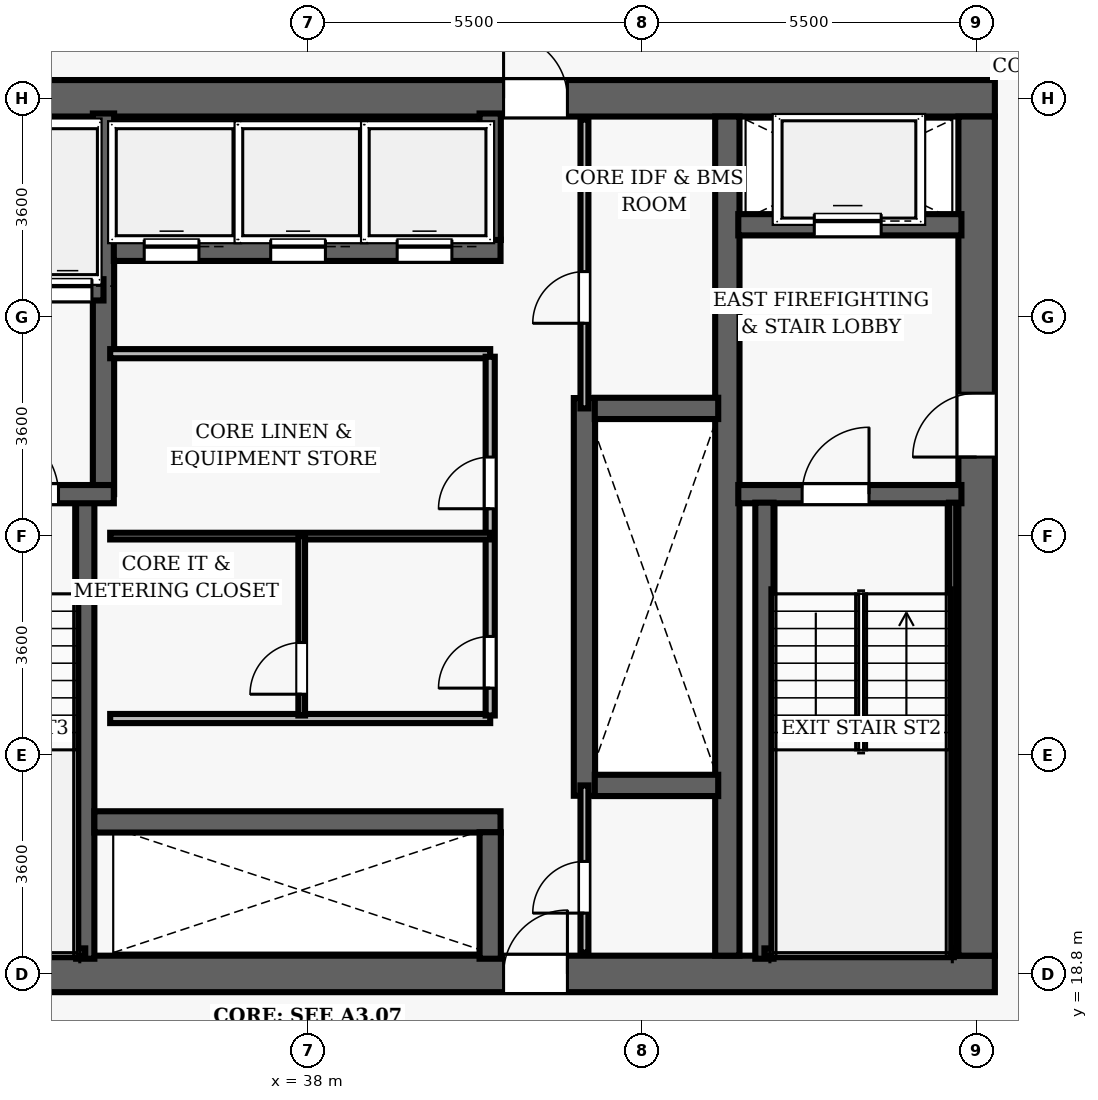
"""IFC4 building model, lengths in metres.
Left out: names, types, materials, properties, quantities, classifications, styles, units other than length and angle.
Written with IfcOpenShell. Run it as: python <this file> out.ifc"""

import sys

from ifc_helpers import new_model, si_unit, direction, frame, frame_2d, origin, place, context, subcontext, project, spatial, rectangle, extrude, element, fill, save


model = new_model("IFC4")
c1 = context("Model", 3, precision=1e-05, world=origin(), true_north=direction((0.0, 1.0)))
c2 = subcontext(c1, "Body", "Model", "MODEL_VIEW")
j1 = project(units=[si_unit("LENGTHUNIT", "METRE"), si_unit("PLANEANGLEUNIT", "RADIAN")], contexts=[c1])
p1 = place(None, origin())
s1 = spatial("IfcSite", under=j1, at=p1, CompositionType="ELEMENT")
p2 = place(p1, origin())
s2 = spatial("IfcBuilding", under=s1, at=p2, CompositionType="ELEMENT")
p3 = place(p2, frame((0.0, 0.0, 62.4)))
s3 = spatial("IfcBuildingStorey", under=s2, at=p3, CompositionType="ELEMENT", Elevation=62.4)
p4 = place(p3, frame((26.7, 18.8, 0.0), z_axis=(0.0, 0.0, 1.0), x_axis=(1.0, 0.0, 0.0)))
e1 = element("IfcWall", 1, at=p4, inside=s3, PredefinedType="SHEAR", context=c2, shape_type="SweptSolid", body=[
    extrude(rectangle(XDim=22.6, YDim=0.6, at=frame_2d((11.3, 0.0))), origin(), (0.0, 0.0, 1.0), 3.5),
])
p5 = place(p4, frame((14.52, 0.0, 0.0)))
e2 = element("IfcOpeningElement", 2, at=p5, cuts=e1, PredefinedType="OPENING", context=c2, shape_type="SweptSolid", body=[
    extrude(rectangle(XDim=1.05, YDim=2.15, at=frame_2d((0.525, 1.075))), frame((0.0, 0.31, 0.0), z_axis=(0.0, -1.0, 0.0), x_axis=(1.0, 0.0, 0.0)), (0.0, 0.0, 1.0), 0.62),
])
p6 = place(p3, frame((26.7, 33.2, 0.0), z_axis=(0.0, 0.0, 1.0), x_axis=(1.0, 0.0, 0.0)))
e3 = element("IfcWall", 3, at=p6, inside=s3, PredefinedType="SHEAR", context=c2, shape_type="SweptSolid", body=[
    extrude(rectangle(XDim=22.6, YDim=0.6, at=frame_2d((11.3, 0.0))), origin(), (0.0, 0.0, 1.0), 3.5),
])
p7 = place(p6, frame((4.62, 0.0, 0.0)))
e4 = element("IfcOpeningElement", 4, at=p7, cuts=e3, PredefinedType="OPENING", context=c2, shape_type="SweptSolid", body=[
    extrude(rectangle(XDim=1.05, YDim=2.15, at=frame_2d((0.525, 1.075))), frame((0.0, 0.31, 0.0), z_axis=(0.0, -1.0, 0.0), x_axis=(1.0, 0.0, 0.0)), (0.0, 0.0, 1.0), 0.62),
])
p8 = place(p6, frame((14.52, 0.0, 0.0)))
e5 = element("IfcOpeningElement", 5, at=p8, cuts=e3, PredefinedType="OPENING", context=c2, shape_type="SweptSolid", body=[
    extrude(rectangle(XDim=1.05, YDim=2.15, at=frame_2d((0.525, 1.075))), frame((0.0, 0.31, 0.0), z_axis=(0.0, -1.0, 0.0), x_axis=(1.0, 0.0, 0.0)), (0.0, 0.0, 1.0), 0.62),
])
p9 = place(p3, frame((49.0, 19.1, 0.0), z_axis=(0.0, 0.0, 1.0), x_axis=(0.0, 1.0, 0.0)))
e6 = element("IfcWall", 6, at=p9, inside=s3, PredefinedType="SHEAR", context=c2, shape_type="SweptSolid", body=[
    extrude(rectangle(XDim=13.8, YDim=0.6, at=frame_2d((6.9, 0.0))), origin(), (0.0, 0.0, 1.0), 3.5),
])
p10 = place(p9, frame((8.2, 0.0, 0.0)))
e7 = element("IfcOpeningElement", 7, at=p10, cuts=e6, PredefinedType="OPENING", context=c2, shape_type="SweptSolid", body=[
    extrude(rectangle(XDim=1.05, YDim=2.15, at=frame_2d((0.525, 1.075))), frame((0.0, 0.31, 0.0), z_axis=(0.0, -1.0, 0.0), x_axis=(1.0, 0.0, 0.0)), (0.0, 0.0, 1.0), 0.62),
])
p11 = place(p3, frame((44.9, 19.1, 0.0), z_axis=(0.0, 0.0, 1.0), x_axis=(0.0, 1.0, 0.0)))
e8 = element("IfcWall", 8, at=p11, inside=s3, PredefinedType="SHEAR", context=c2, shape_type="SweptSolid", body=[
    extrude(rectangle(XDim=13.8, YDim=0.4, at=frame_2d((6.9, 0.0))), origin(), (0.0, 0.0, 1.0), 3.5),
])
p12 = place(p3, frame((45.08, 26.69, 0.0), z_axis=(0.0, 0.0, 1.0), x_axis=(1.0, 0.0, 0.0)))
e9 = element("IfcWall", 9, at=p12, inside=s3, PredefinedType="SHEAR", context=c2, shape_type="SweptSolid", body=[
    extrude(rectangle(XDim=3.67, YDim=0.3, at=frame_2d((1.835, 0.0))), origin(), (0.0, 0.0, 1.0), 3.5),
])
p13 = place(p12, frame((1.05, 0.0, 0.0)))
e10 = element("IfcOpeningElement", 10, at=p13, cuts=e9, PredefinedType="OPENING", context=c2, shape_type="SweptSolid", body=[
    extrude(rectangle(XDim=1.1, YDim=2.15, at=frame_2d((0.55, 1.075))), frame((0.0, 0.16, 0.0), z_axis=(0.0, -1.0, 0.0), x_axis=(1.0, 0.0, 0.0)), (0.0, 0.0, 1.0), 0.32),
])
p14 = place(p3, frame((45.51, 19.05, 0.0), z_axis=(0.0, 0.0, 1.0), x_axis=(0.0, 1.0, 0.0)))
e11 = element("IfcWall", 11, at=p14, inside=s3, PredefinedType="SHEAR", context=c2, shape_type="SweptSolid", body=[
    extrude(rectangle(XDim=7.5, YDim=0.3, at=frame_2d((3.75, 0.0))), origin(), (0.0, 0.0, 1.0), 3.5),
])
p15 = place(p3, frame((48.605, 19.1, 0.0), z_axis=(0.0, 0.0, 1.0), x_axis=(0.0, 1.0, 0.0)))
e12 = element("IfcWall", 12, at=p15, inside=s3, PredefinedType="SHEAR", context=c2, shape_type="SweptSolid", body=[
    extrude(rectangle(XDim=7.45, YDim=0.12, at=frame_2d((3.725, 0.0))), origin(), (0.0, 0.0, 1.0), 3.5),
])
p16 = place(p3, frame((45.51, 19.16, 0.0), z_axis=(0.0, 0.0, 1.0), x_axis=(1.0, 0.0, 0.0)))
e13 = element("IfcWall", 13, at=p16, inside=s3, PredefinedType="SHEAR", context=c2, shape_type="SweptSolid", body=[
    extrude(rectangle(XDim=3.095, YDim=0.12, at=frame_2d((1.547, 0.0))), origin(), (0.0, 0.0, 1.0), 3.5),
])
p17 = place(p3, frame((45.08, 31.12, 0.0), z_axis=(0.0, 0.0, 1.0), x_axis=(1.0, 0.0, 0.0)))
e14 = element("IfcWall", 14, at=p17, inside=s3, PredefinedType="SHEAR", context=c2, shape_type="SweptSolid", body=[
    extrude(rectangle(XDim=3.67, YDim=0.35, at=frame_2d((1.835, 0.0))), origin(), (0.0, 0.0, 1.0), 2.6),
])
p18 = place(p17, frame((1.25, 0.0, 0.0)))
e15 = element("IfcOpeningElement", 15, at=p18, cuts=e14, PredefinedType="OPENING", context=c2, shape_type="SweptSolid", body=[
    extrude(rectangle(XDim=1.1, YDim=2.15, at=frame_2d((0.55, 1.075))), frame((0.0, 0.185, 0.0), z_axis=(0.0, -1.0, 0.0), x_axis=(1.0, 0.0, 0.0)), (0.0, 0.0, 1.0), 0.37),
])
p19 = place(p3, frame((34.34, 19.05, 0.0), z_axis=(0.0, 0.0, 1.0), x_axis=(0.0, 1.0, 0.0)))
e16 = element("IfcWall", 16, at=p19, inside=s3, PredefinedType="SHEAR", context=c2, shape_type="SweptSolid", body=[
    extrude(rectangle(XDim=7.5, YDim=0.3, at=frame_2d((3.75, 0.0))), origin(), (0.0, 0.0, 1.0), 3.5),
])
p20 = place(p3, frame((34.64, 26.69, 0.0), z_axis=(0.0, 0.0, 1.0), x_axis=(0.0, 1.0, 0.0)))
e17 = element("IfcWall", 17, at=p20, inside=s3, PredefinedType="SHEAR", context=c2, shape_type="SweptSolid", body=[
    extrude(rectangle(XDim=6.26, YDim=0.35, at=frame_2d((3.13, 0.0))), origin(), (0.0, 0.0, 1.0), 3.5),
])
p21 = place(p3, frame((31.25, 26.69, 0.0), z_axis=(0.0, 0.0, 1.0), x_axis=(1.0, 0.0, 0.0)))
e18 = element("IfcWall", 18, at=p21, inside=s3, PredefinedType="SHEAR", context=c2, shape_type="SweptSolid", body=[
    extrude(rectangle(XDim=3.56, YDim=0.3, at=frame_2d((1.78, 0.0))), origin(), (0.0, 0.0, 1.0), 3.5),
])
p22 = place(p21, frame((1.55, 0.0, 0.0)))
e19 = element("IfcOpeningElement", 19, at=p22, cuts=e18, PredefinedType="OPENING", context=c2, shape_type="SweptSolid", body=[
    extrude(rectangle(XDim=1.1, YDim=2.15, at=frame_2d((0.55, 1.075))), frame((0.0, 0.16, 0.0), z_axis=(0.0, -1.0, 0.0), x_axis=(1.0, 0.0, 0.0)), (0.0, 0.0, 1.0), 0.32),
])
p23 = place(p3, frame((31.3, 19.16, 0.0), z_axis=(0.0, 0.0, 1.0), x_axis=(1.0, 0.0, 0.0)))
e20 = element("IfcWall", 20, at=p23, inside=s3, PredefinedType="SHEAR", context=c2, shape_type="SweptSolid", body=[
    extrude(rectangle(XDim=3.04, YDim=0.12, at=frame_2d((1.52, 0.0))), origin(), (0.0, 0.0, 1.0), 3.5),
])
p24 = place(p3, frame((32.23, 30.05, 0.0), z_axis=(0.0, 0.0, 1.0), x_axis=(1.0, 0.0, 0.0)))
e21 = element("IfcWall", 21, at=p24, inside=s3, PredefinedType="SHEAR", context=c2, shape_type="SweptSolid", body=[
    extrude(rectangle(XDim=2.41, YDim=0.35, at=frame_2d((1.205, 0.0))), origin(), (0.0, 0.0, 1.0), 2.6),
])
p25 = place(p24, frame((0.42, 0.0, 0.0)))
e22 = element("IfcOpeningElement", 22, at=p25, cuts=e21, PredefinedType="OPENING", context=c2, shape_type="SweptSolid", body=[
    extrude(rectangle(XDim=0.8, YDim=2.15, at=frame_2d((0.4, 1.075))), frame((0.0, 0.185, 0.0), z_axis=(0.0, -1.0, 0.0), x_axis=(1.0, 0.0, 0.0)), (0.0, 0.0, 1.0), 0.37),
])
p26 = place(p24, frame((1.42, 0.0, 0.0)))
e23 = element("IfcOpeningElement", 23, at=p26, cuts=e21, PredefinedType="OPENING", context=c2, shape_type="SweptSolid", body=[
    extrude(rectangle(XDim=0.8, YDim=2.15, at=frame_2d((0.4, 1.075))), frame((0.0, 0.185, 0.0), z_axis=(0.0, -1.0, 0.0), x_axis=(1.0, 0.0, 0.0)), (0.0, 0.0, 1.0), 0.37),
])
p27 = place(p3, frame((42.55, 21.73, 0.0), z_axis=(0.0, 0.0, 1.0), x_axis=(0.0, 1.0, 0.0)))
e24 = element("IfcWall", 24, at=p27, inside=s3, PredefinedType="SHEAR", context=c2, shape_type="SweptSolid", body=[
    extrude(rectangle(XDim=6.54, YDim=0.35, at=frame_2d((3.27, 0.0))), origin(), (0.0, 0.0, 1.0), 2.6),
])
for number, where, z_axis, x_axis in (
    (25, (42.72, 21.9, 0.0), (0.0, 0.0, 1.0), (1.0, 0.0, 0.0)),
    (26, (42.72, 28.1, 0.0), (0.0, 0.0, 1.0), (1.0, 0.0, 0.0)),
):
    element("IfcWall", number, at=place(p3, frame(where, z_axis=z_axis, x_axis=x_axis)), inside=s3, PredefinedType="SHEAR", context=c2, shape_type="SweptSolid", body=[
        extrude(rectangle(XDim=2.03, YDim=0.35, at=frame_2d((1.015, 0.0))), origin(), (0.0, 0.0, 1.0), 2.6),
    ])
p28 = place(p3, frame((34.81, 30.7, 0.0), z_axis=(0.0, 0.0, 1.0), x_axis=(1.0, 0.0, 0.0)))
e27 = element("IfcWall", 27, at=p28, inside=s3, PredefinedType="SHEAR", context=c2, shape_type="SweptSolid", body=[
    extrude(rectangle(XDim=6.36, YDim=0.35, at=frame_2d((3.18, 0.0))), origin(), (0.0, 0.0, 1.0), 2.6),
])
p29 = place(p28, frame((0.5, 0.0, 0.0)))
e28 = element("IfcOpeningElement", 28, at=p29, cuts=e27, PredefinedType="OPENING", context=c2, shape_type="SweptSolid", body=[
    extrude(rectangle(XDim=0.9, YDim=2.15, at=frame_2d((0.45, 1.075))), frame((0.0, 0.185, 0.0), z_axis=(0.0, -1.0, 0.0), x_axis=(1.0, 0.0, 0.0)), (0.0, 0.0, 1.0), 0.37),
])
p30 = place(p28, frame((2.58, 0.0, 0.0)))
e29 = element("IfcOpeningElement", 29, at=p30, cuts=e27, PredefinedType="OPENING", context=c2, shape_type="SweptSolid", body=[
    extrude(rectangle(XDim=0.9, YDim=2.15, at=frame_2d((0.45, 1.075))), frame((0.0, 0.185, 0.0), z_axis=(0.0, -1.0, 0.0), x_axis=(1.0, 0.0, 0.0)), (0.0, 0.0, 1.0), 0.37),
])
p31 = place(p28, frame((4.66, 0.0, 0.0)))
e30 = element("IfcOpeningElement", 30, at=p31, cuts=e27, PredefinedType="OPENING", context=c2, shape_type="SweptSolid", body=[
    extrude(rectangle(XDim=0.9, YDim=2.15, at=frame_2d((0.45, 1.075))), frame((0.0, 0.185, 0.0), z_axis=(0.0, -1.0, 0.0), x_axis=(1.0, 0.0, 0.0)), (0.0, 0.0, 1.0), 0.37),
])
p32 = place(p3, frame((41.0, 30.87, 0.0), z_axis=(0.0, 0.0, 1.0), x_axis=(0.0, 1.0, 0.0)))
e31 = element("IfcWall", 31, at=p32, inside=s3, PredefinedType="SHEAR", context=c2, shape_type="SweptSolid", body=[
    extrude(rectangle(XDim=2.08, YDim=0.35, at=frame_2d((1.04, 0.0))), origin(), (0.0, 0.0, 1.0), 2.6),
])
p33 = place(p3, frame((34.49, 21.3, 0.0), z_axis=(0.0, 0.0, 1.0), x_axis=(1.0, 0.0, 0.0)))
e32 = element("IfcWall", 32, at=p33, inside=s3, PredefinedType="SHEAR", context=c2, shape_type="SweptSolid", body=[
    extrude(rectangle(XDim=6.68, YDim=0.35, at=frame_2d((3.34, 0.0))), origin(), (0.0, 0.0, 1.0), 2.6),
])
p34 = place(p3, frame((41.0, 19.05, 0.0), z_axis=(0.0, 0.0, 1.0), x_axis=(0.0, 1.0, 0.0)))
e33 = element("IfcWall", 33, at=p34, inside=s3, PredefinedType="SHEAR", context=c2, shape_type="SweptSolid", body=[
    extrude(rectangle(XDim=2.08, YDim=0.35, at=frame_2d((1.04, 0.0))), origin(), (0.0, 0.0, 1.0), 2.6),
])
for number, where, z_axis, x_axis in (
    (34, (34.75, 29.0, 0.0), (0.0, 0.0, 1.0), (1.0, 0.0, 0.0)),
    (35, (34.75, 23.0, 0.0), (0.0, 0.0, 1.0), (1.0, 0.0, 0.0)),
):
    element("IfcWall", number, at=place(p3, frame(where, z_axis=z_axis, x_axis=x_axis)), inside=s3, PredefinedType="PARTITIONING", context=c2, shape_type="SweptSolid", body=[
        extrude(rectangle(XDim=6.25, YDim=0.15, at=frame_2d((3.125, 0.0))), origin(), (0.0, 0.0, 1.0), 2.6),
    ])
p35 = place(p3, frame((41.0, 23.05, 0.0), z_axis=(0.0, 0.0, 1.0), x_axis=(0.0, 1.0, 0.0)))
e36 = element("IfcWall", 36, at=p35, inside=s3, PredefinedType="PARTITIONING", context=c2, shape_type="SweptSolid", body=[
    extrude(rectangle(XDim=5.9, YDim=0.15, at=frame_2d((2.95, 0.0))), origin(), (0.0, 0.0, 1.0), 2.6),
])
p36 = place(p35, frame((3.4, 0.0, 0.0)))
e37 = element("IfcOpeningElement", 37, at=p36, cuts=e36, PredefinedType="OPENING", context=c2, shape_type="SweptSolid", body=[
    extrude(rectangle(XDim=0.85, YDim=2.1, at=frame_2d((0.425, 1.05))), frame((0.0, 0.085, 0.0), z_axis=(0.0, -1.0, 0.0), x_axis=(1.0, 0.0, 0.0)), (0.0, 0.0, 1.0), 0.17),
])
p37 = place(p35, frame((0.45, 0.0, 0.0)))
e38 = element("IfcOpeningElement", 38, at=p37, cuts=e36, PredefinedType="OPENING", context=c2, shape_type="SweptSolid", body=[
    extrude(rectangle(XDim=0.85, YDim=2.1, at=frame_2d((0.425, 1.05))), frame((0.0, 0.085, 0.0), z_axis=(0.0, -1.0, 0.0), x_axis=(1.0, 0.0, 0.0)), (0.0, 0.0, 1.0), 0.17),
])
p38 = place(p3, frame((34.75, 26.0, 0.0), z_axis=(0.0, 0.0, 1.0), x_axis=(1.0, 0.0, 0.0)))
e39 = element("IfcWall", 39, at=p38, inside=s3, PredefinedType="PARTITIONING", context=c2, shape_type="SweptSolid", body=[
    extrude(rectangle(XDim=6.25, YDim=0.11, at=frame_2d((3.125, 0.0))), origin(), (0.0, 0.0, 1.0), 2.6),
])
p39 = place(p3, frame((37.9, 23.05, 0.0), z_axis=(0.0, 0.0, 1.0), x_axis=(0.0, 1.0, 0.0)))
e40 = element("IfcWall", 40, at=p39, inside=s3, PredefinedType="PARTITIONING", context=c2, shape_type="SweptSolid", body=[
    extrude(rectangle(XDim=2.95, YDim=0.11, at=frame_2d((1.475, 0.0))), origin(), (0.0, 0.0, 1.0), 2.6),
])
p40 = place(p39, frame((0.35, 0.0, 0.0)))
e41 = element("IfcOpeningElement", 41, at=p40, cuts=e40, PredefinedType="OPENING", context=c2, shape_type="SweptSolid", body=[
    extrude(rectangle(XDim=0.85, YDim=2.1, at=frame_2d((0.425, 1.05))), frame((0.0, 0.065, 0.0), z_axis=(0.0, -1.0, 0.0), x_axis=(1.0, 0.0, 0.0)), (0.0, 0.0, 1.0), 0.13),
])
p41 = place(p3, frame((42.55, 28.1, 0.0), z_axis=(0.0, 0.0, 1.0), x_axis=(0.0, 1.0, 0.0)))
e42 = element("IfcWall", 42, at=p41, inside=s3, PredefinedType="PARTITIONING", context=c2, shape_type="SweptSolid", body=[
    extrude(rectangle(XDim=4.75, YDim=0.13, at=frame_2d((2.375, 0.0))), origin(), (0.0, 0.0, 1.0), 2.6),
])
p42 = place(p41, frame((1.4, 0.0, 0.0)))
e43 = element("IfcOpeningElement", 43, at=p42, cuts=e42, PredefinedType="OPENING", context=c2, shape_type="SweptSolid", body=[
    extrude(rectangle(XDim=0.85, YDim=2.1, at=frame_2d((0.425, 1.05))), frame((0.0, 0.075, 0.0), z_axis=(0.0, -1.0, 0.0), x_axis=(1.0, 0.0, 0.0)), (0.0, 0.0, 1.0), 0.15),
])
p43 = place(p3, frame((42.55, 19.15, 0.0), z_axis=(0.0, 0.0, 1.0), x_axis=(0.0, 1.0, 0.0)))
e44 = element("IfcWall", 44, at=p43, inside=s3, PredefinedType="PARTITIONING", context=c2, shape_type="SweptSolid", body=[
    extrude(rectangle(XDim=2.75, YDim=0.13, at=frame_2d((1.375, 0.0))), origin(), (0.0, 0.0, 1.0), 2.6),
])
p44 = place(p43, frame((0.65, 0.0, 0.0)))
e45 = element("IfcOpeningElement", 45, at=p44, cuts=e44, PredefinedType="OPENING", context=c2, shape_type="SweptSolid", body=[
    extrude(rectangle(XDim=0.85, YDim=2.1, at=frame_2d((0.425, 1.05))), frame((0.0, 0.075, 0.0), z_axis=(0.0, -1.0, 0.0), x_axis=(1.0, 0.0, 0.0)), (0.0, 0.0, 1.0), 0.15),
])
p45 = place(p13, origin())
e46 = element("IfcDoor", 46, at=p45, inside=s3, OperationType="SINGLE_SWING_RIGHT", PredefinedType="DOOR", context=c2, shape_type="SweptSolid", body=[
    extrude(rectangle(XDim=1.1, YDim=2.15, at=frame_2d((0.55, 1.075))), frame((0.0, 0.025, 0.0), z_axis=(0.0, -1.0, 0.0), x_axis=(1.0, 0.0, 0.0)), (0.0, 0.0, 1.0), 0.05),
])
fill(e10, e46)
p46 = place(p10, origin())
e47 = element("IfcDoor", 47, at=p46, inside=s3, OperationType="SINGLE_SWING_LEFT", PredefinedType="DOOR", context=c2, shape_type="SweptSolid", body=[
    extrude(rectangle(XDim=1.05, YDim=2.15, at=frame_2d((0.525, 1.075))), frame((0.0, 0.025, 0.0), z_axis=(0.0, -1.0, 0.0), x_axis=(1.0, 0.0, 0.0)), (0.0, 0.0, 1.0), 0.05),
])
fill(e7, e47)
p47 = place(p22, origin())
e48 = element("IfcDoor", 48, at=p47, inside=s3, OperationType="SINGLE_SWING_LEFT", PredefinedType="DOOR", context=c2, shape_type="SweptSolid", body=[
    extrude(rectangle(XDim=1.1, YDim=2.15, at=frame_2d((0.55, 1.075))), frame((0.0, 0.025, 0.0), z_axis=(0.0, -1.0, 0.0), x_axis=(1.0, 0.0, 0.0)), (0.0, 0.0, 1.0), 0.05),
])
fill(e19, e48)
p48 = place(p8, origin())
e49 = element("IfcDoor", 49, at=p48, inside=s3, OperationType="SINGLE_SWING_LEFT", PredefinedType="DOOR", context=c2, shape_type="SweptSolid", body=[
    extrude(rectangle(XDim=1.05, YDim=2.15, at=frame_2d((0.525, 1.075))), frame((0.0, 0.025, 0.0), z_axis=(0.0, -1.0, 0.0), x_axis=(1.0, 0.0, 0.0)), (0.0, 0.0, 1.0), 0.05),
])
fill(e5, e49)
p49 = place(p5, origin())
e50 = element("IfcDoor", 50, at=p49, inside=s3, OperationType="SINGLE_SWING_RIGHT", PredefinedType="DOOR", context=c2, shape_type="SweptSolid", body=[
    extrude(rectangle(XDim=1.05, YDim=2.15, at=frame_2d((0.525, 1.075))), frame((0.0, 0.025, 0.0), z_axis=(0.0, -1.0, 0.0), x_axis=(1.0, 0.0, 0.0)), (0.0, 0.0, 1.0), 0.05),
])
fill(e2, e50)
p50 = place(p36, origin())
e51 = element("IfcDoor", 51, at=p50, inside=s3, OperationType="SINGLE_SWING_LEFT", PredefinedType="DOOR", context=c2, shape_type="SweptSolid", body=[
    extrude(rectangle(XDim=0.85, YDim=2.1, at=frame_2d((0.425, 1.05))), frame((0.0, 0.025, 0.0), z_axis=(0.0, -1.0, 0.0), x_axis=(1.0, 0.0, 0.0)), (0.0, 0.0, 1.0), 0.05),
])
fill(e37, e51)
p51 = place(p37, origin())
e52 = element("IfcDoor", 52, at=p51, inside=s3, OperationType="SINGLE_SWING_LEFT", PredefinedType="DOOR", context=c2, shape_type="SweptSolid", body=[
    extrude(rectangle(XDim=0.85, YDim=2.1, at=frame_2d((0.425, 1.05))), frame((0.0, 0.025, 0.0), z_axis=(0.0, -1.0, 0.0), x_axis=(1.0, 0.0, 0.0)), (0.0, 0.0, 1.0), 0.05),
])
fill(e38, e52)
p52 = place(p40, origin())
e53 = element("IfcDoor", 53, at=p52, inside=s3, OperationType="SINGLE_SWING_LEFT", PredefinedType="DOOR", context=c2, shape_type="SweptSolid", body=[
    extrude(rectangle(XDim=0.85, YDim=2.1, at=frame_2d((0.425, 1.05))), frame((0.0, 0.025, 0.0), z_axis=(0.0, -1.0, 0.0), x_axis=(1.0, 0.0, 0.0)), (0.0, 0.0, 1.0), 0.05),
])
fill(e41, e53)
p53 = place(p42, origin())
e54 = element("IfcDoor", 54, at=p53, inside=s3, OperationType="SINGLE_SWING_LEFT", PredefinedType="DOOR", context=c2, shape_type="SweptSolid", body=[
    extrude(rectangle(XDim=0.85, YDim=2.1, at=frame_2d((0.425, 1.05))), frame((0.0, 0.025, 0.0), z_axis=(0.0, -1.0, 0.0), x_axis=(1.0, 0.0, 0.0)), (0.0, 0.0, 1.0), 0.05),
])
fill(e43, e54)
p54 = place(p44, origin())
e55 = element("IfcDoor", 55, at=p54, inside=s3, OperationType="SINGLE_SWING_LEFT", PredefinedType="DOOR", context=c2, shape_type="SweptSolid", body=[
    extrude(rectangle(XDim=0.85, YDim=2.1, at=frame_2d((0.425, 1.05))), frame((0.0, 0.025, 0.0), z_axis=(0.0, -1.0, 0.0), x_axis=(1.0, 0.0, 0.0)), (0.0, 0.0, 1.0), 0.05),
])
fill(e45, e55)
p55 = place(p29, origin())
e56 = element("IfcDoor", 56, at=p55, inside=s3, OperationType="SLIDING_TO_LEFT", PredefinedType="DOOR", context=c2, shape_type="SweptSolid", body=[
    extrude(rectangle(XDim=0.9, YDim=2.15, at=frame_2d((0.45, 1.075))), frame((0.0, 0.025, 0.0), z_axis=(0.0, -1.0, 0.0), x_axis=(1.0, 0.0, 0.0)), (0.0, 0.0, 1.0), 0.05),
])
fill(e28, e56)
p56 = place(p30, origin())
e57 = element("IfcDoor", 57, at=p56, inside=s3, OperationType="SLIDING_TO_LEFT", PredefinedType="DOOR", context=c2, shape_type="SweptSolid", body=[
    extrude(rectangle(XDim=0.9, YDim=2.15, at=frame_2d((0.45, 1.075))), frame((0.0, 0.025, 0.0), z_axis=(0.0, -1.0, 0.0), x_axis=(1.0, 0.0, 0.0)), (0.0, 0.0, 1.0), 0.05),
])
fill(e29, e57)
p57 = place(p31, origin())
e58 = element("IfcDoor", 58, at=p57, inside=s3, OperationType="SLIDING_TO_LEFT", PredefinedType="DOOR", context=c2, shape_type="SweptSolid", body=[
    extrude(rectangle(XDim=0.9, YDim=2.15, at=frame_2d((0.45, 1.075))), frame((0.0, 0.025, 0.0), z_axis=(0.0, -1.0, 0.0), x_axis=(1.0, 0.0, 0.0)), (0.0, 0.0, 1.0), 0.05),
])
fill(e30, e58)
p58 = place(p18, origin())
e59 = element("IfcDoor", 59, at=p58, inside=s3, OperationType="SLIDING_TO_LEFT", PredefinedType="DOOR", context=c2, shape_type="SweptSolid", body=[
    extrude(rectangle(XDim=1.1, YDim=2.15, at=frame_2d((0.55, 1.075))), frame((0.0, 0.025, 0.0), z_axis=(0.0, -1.0, 0.0), x_axis=(1.0, 0.0, 0.0)), (0.0, 0.0, 1.0), 0.05),
])
fill(e15, e59)
p59 = place(p26, origin())
e60 = element("IfcDoor", 60, at=p59, inside=s3, OperationType="SLIDING_TO_LEFT", PredefinedType="DOOR", context=c2, shape_type="SweptSolid", body=[
    extrude(rectangle(XDim=0.8, YDim=2.15, at=frame_2d((0.4, 1.075))), frame((0.0, 0.025, 0.0), z_axis=(0.0, -1.0, 0.0), x_axis=(1.0, 0.0, 0.0)), (0.0, 0.0, 1.0), 0.05),
])
fill(e23, e60)
save(model, sys.argv[1])
